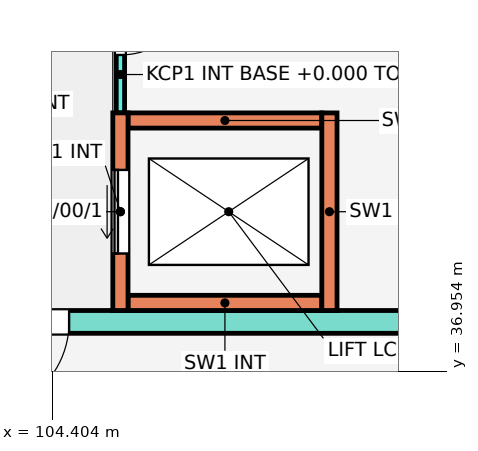
"""IFC4 building model, lengths in metres.
Left out: names, types, materials, properties, quantities, classifications, styles, units other than length and angle.
Written with IfcOpenShell. Run it as: python <this file> out.ifc"""

import sys

from ifc_helpers import new_model, si_unit, direction, frame, frame_2d, origin, place, context, subcontext, project, spatial, rectangle, extrude, element, fill, save


model = new_model("IFC4")
c1 = context("Model", 3, precision=1e-05, world=origin(), true_north=direction((0.0, 1.0)))
c2 = subcontext(c1, "Body", "Model", "MODEL_VIEW")
j1 = project(units=[si_unit("LENGTHUNIT", "METRE"), si_unit("PLANEANGLEUNIT", "RADIAN")], contexts=[c1])
p1 = place(None, origin())
s1 = spatial("IfcSite", under=j1, at=p1, CompositionType="ELEMENT")
p2 = place(p1, origin())
s2 = spatial("IfcBuilding", under=s1, at=p2, CompositionType="ELEMENT")
p3 = place(p2, origin())
s3 = spatial("IfcBuildingStorey", under=s2, at=p3, CompositionType="ELEMENT", Elevation=0.0)
p4 = place(p3, frame((114.4, 37.6, -0.25), z_axis=(0.0, 0.0, 1.0), x_axis=(-1.0, 0.0, 0.0)))
e1 = element("IfcWall", 1, at=p4, inside=s3, PredefinedType="SOLIDWALL", context=c2, shape_type="SweptSolid", body=[
    extrude(rectangle(XDim=22.0, YDim=0.3, at=frame_2d((11.0, 0.0))), origin(), (0.0, 0.0, 1.0), 3.25),
])
p5 = place(p4, frame((14.298, 0.0, 1.15)))
e2 = element("IfcOpeningElement", 2, at=p5, cuts=e1, PredefinedType="OPENING", context=c2, shape_type="SweptSolid", body=[
    extrude(rectangle(XDim=1.2, YDim=1.5, at=frame_2d((0.6, 0.75))), frame((0.0, 0.16, 0.0), z_axis=(0.0, -1.0, 0.0), x_axis=(1.0, 0.0, 0.0)), (0.0, 0.0, 1.0), 0.32),
])
p6 = place(p4, frame((9.775, 0.0, 0.25)))
e3 = element("IfcOpeningElement", 3, at=p6, cuts=e1, PredefinedType="OPENING", context=c2, shape_type="SweptSolid", body=[
    extrude(rectangle(XDim=1.2, YDim=2.1, at=frame_2d((0.6, 1.05))), frame((0.0, 0.16, 0.0), z_axis=(0.0, -1.0, 0.0), x_axis=(1.0, 0.0, 0.0)), (0.0, 0.0, 1.0), 0.32),
])
p7 = place(p4, frame((11.85, 0.0, 0.25)))
e4 = element("IfcOpeningElement", 4, at=p7, cuts=e1, PredefinedType="OPENING", context=c2, shape_type="SweptSolid", body=[
    extrude(rectangle(XDim=1.0, YDim=2.1, at=frame_2d((0.5, 1.05))), frame((0.0, 0.16, 0.0), z_axis=(0.0, -1.0, 0.0), x_axis=(1.0, 0.0, 0.0)), (0.0, 0.0, 1.0), 0.32),
])
p8 = place(p3, frame((105.3, 40.35, 0.0), z_axis=(0.0, 0.0, 1.0), x_axis=(0.0, 1.0, 0.0)))
e5 = element("IfcWall", 5, at=p8, inside=s3, PredefinedType="PARTITIONING", context=c2, shape_type="SweptSolid", body=[
    extrude(rectangle(XDim=2.525, YDim=0.11, at=frame_2d((1.262, 0.0))), origin(), (0.0, 0.0, 1.0), 2.75),
])
p9 = place(p8, frame((0.762, 0.0, 0.0)))
e6 = element("IfcOpeningElement", 6, at=p9, cuts=e5, PredefinedType="OPENING", context=c2, shape_type="SweptSolid", body=[
    extrude(rectangle(XDim=1.0, YDim=2.1, at=frame_2d((0.5, 1.05))), frame((0.0, 0.065, 0.0), z_axis=(0.0, -1.0, 0.0), x_axis=(1.0, 0.0, 0.0)), (0.0, 0.0, 1.0), 0.13),
])
for number, where, z_axis, x_axis in (
    (7, (107.95, 40.25, -1.05), (0.0, 0.0, 1.0), (-1.0, 0.0, 0.0)),
    (8, (107.95, 37.85, -1.05), (0.0, 0.0, 1.0), (-1.0, 0.0, 0.0)),
):
    element("IfcWall", number, at=place(p3, frame(where, z_axis=z_axis, x_axis=x_axis)), inside=s3, PredefinedType="SOLIDWALL", context=c2, shape_type="SweptSolid", body=[
        extrude(rectangle(XDim=2.55, YDim=0.2, at=frame_2d((1.275, 0.0))), origin(), (0.0, 0.0, 1.0), 4.05),
    ])
p10 = place(p3, frame((108.05, 37.75, -1.05), z_axis=(0.0, 0.0, 1.0), x_axis=(0.0, 1.0, 0.0)))
e9 = element("IfcWall", 9, at=p10, inside=s3, PredefinedType="SOLIDWALL", context=c2, shape_type="SweptSolid", body=[
    extrude(rectangle(XDim=2.6, YDim=0.2, at=frame_2d((1.3, 0.0))), origin(), (0.0, 0.0, 1.0), 4.05),
])
p11 = place(p3, frame((105.3, 37.75, -1.05), z_axis=(0.0, 0.0, 1.0), x_axis=(0.0, 1.0, 0.0)))
e10 = element("IfcWall", 10, at=p11, inside=s3, PredefinedType="SOLIDWALL", context=c2, shape_type="SweptSolid", body=[
    extrude(rectangle(XDim=2.6, YDim=0.2, at=frame_2d((1.3, 0.0))), origin(), (0.0, 0.0, 1.0), 4.05),
])
p12 = place(p11, frame((0.75, 0.0, 1.05)))
e11 = element("IfcOpeningElement", 11, at=p12, cuts=e10, PredefinedType="OPENING", context=c2, shape_type="SweptSolid", body=[
    extrude(rectangle(XDim=1.1, YDim=2.1, at=frame_2d((0.55, 1.05))), frame((0.0, 0.11, 0.0), z_axis=(0.0, -1.0, 0.0), x_axis=(1.0, 0.0, 0.0)), (0.0, 0.0, 1.0), 0.22),
])
p13 = place(p6, origin())
e12 = element("IfcDoor", 12, at=p13, inside=s3, OperationType="SINGLE_SWING_RIGHT", PredefinedType="DOOR", context=c2, shape_type="SweptSolid", body=[
    extrude(rectangle(XDim=1.2, YDim=2.1, at=frame_2d((0.6, 1.05))), frame((0.0, 0.025, 0.0), z_axis=(0.0, -1.0, 0.0), x_axis=(1.0, 0.0, 0.0)), (0.0, 0.0, 1.0), 0.05),
])
fill(e3, e12)
p14 = place(p9, origin())
e13 = element("IfcDoor", 13, at=p14, inside=s3, OperationType="SINGLE_SWING_RIGHT", PredefinedType="DOOR", context=c2, shape_type="SweptSolid", body=[
    extrude(rectangle(XDim=1.0, YDim=2.1, at=frame_2d((0.5, 1.05))), frame((0.0, 0.025, 0.0), z_axis=(0.0, -1.0, 0.0), x_axis=(1.0, 0.0, 0.0)), (0.0, 0.0, 1.0), 0.05),
])
fill(e6, e13)
p15 = place(p12, origin())
e14 = element("IfcDoor", 14, at=p15, inside=s3, OperationType="SLIDING_TO_LEFT", PredefinedType="DOOR", context=c2, shape_type="SweptSolid", body=[
    extrude(rectangle(XDim=1.1, YDim=2.1, at=frame_2d((0.55, 1.05))), frame((0.0, 0.025, 0.0), z_axis=(0.0, -1.0, 0.0), x_axis=(1.0, 0.0, 0.0)), (0.0, 0.0, 1.0), 0.05),
])
fill(e11, e14)
save(model, sys.argv[1])
